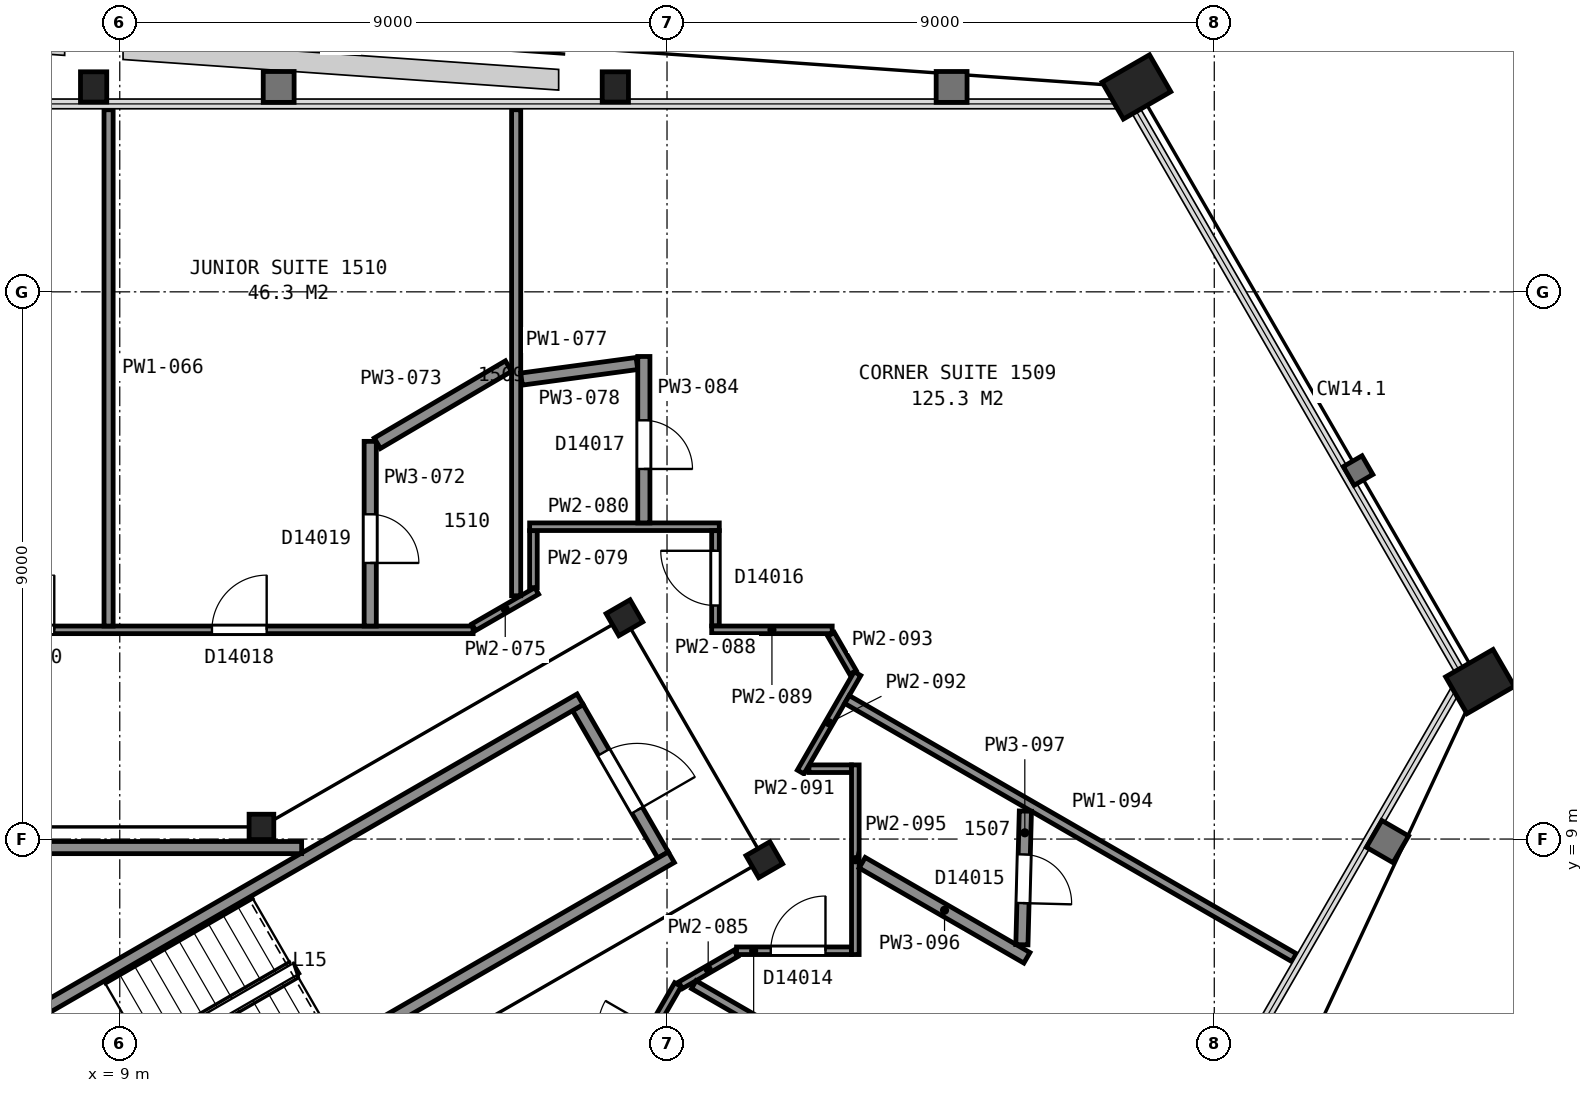
"""IFC4 building model, lengths in metres.
Left out: names, types, materials, properties, quantities, classifications, styles, units other than length and angle.
Written with IfcOpenShell. Run it as: python <this file> out.ifc"""

import sys

from ifc_helpers import new_model, si_unit, direction, frame, frame_2d, origin, origin_2d, place, context, subcontext, project, spatial, rectangle, hollow_rectangle, i_section, extrude, element, fill, save


model = new_model("IFC4")
c1 = context("Model", 3, precision=1e-05, world=origin(), true_north=direction((0.0, 1.0)))
c2 = subcontext(c1, "Body", "Model", "MODEL_VIEW")
j1 = project(units=[si_unit("LENGTHUNIT", "METRE"), si_unit("PLANEANGLEUNIT", "RADIAN")], contexts=[c1])
p1 = place(None, origin())
s1 = spatial("IfcSite", under=j1, at=p1, CompositionType="ELEMENT")
p2 = place(p1, origin())
s2 = spatial("IfcBuilding", under=s1, at=p2, CompositionType="ELEMENT")
p3 = place(p2, frame((0.0, 0.0, 69.2)))
s3 = spatial("IfcBuildingStorey", under=s2, at=p3, CompositionType="ELEMENT", Elevation=69.2)
p4 = place(p3, frame((25.72, 21.37, 0.0), z_axis=(0.0, 0.0, 1.0), x_axis=(0.5, -0.866025403784, 0.0)))
e1 = element("IfcColumn", 1, at=p4, inside=s3, PredefinedType="COLUMN", context=c2, shape_type="SweptSolid", body=[
    extrude(hollow_rectangle(XDim=0.7, YDim=0.9, WallThickness=0.065, at=origin_2d()), origin(), (0.0, 0.0, 1.0), 3.56),
])
for number, where, z_axis, x_axis in (
    (2, (17.15, 21.37, 0.0), (0.0, 0.0, 1.0), (1.0, 0.0, 0.0)),
    (3, (8.57, 21.37, 0.0), (0.0, 0.0, 1.0), (1.0, 0.0, 0.0)),
):
    element("IfcColumn", number, at=place(p3, frame(where, z_axis=z_axis, x_axis=x_axis)), inside=s3, PredefinedType="COLUMN", context=c2, shape_type="SweptSolid", body=[
        extrude(i_section(OverallWidth=0.432, OverallDepth=0.498, WebThickness=0.056, FlangeThickness=0.089, FilletRadius=0.015, at=origin_2d()), origin(), (0.0, 0.0, 1.0), 3.575),
    ])
p5 = place(p3, frame((31.37, 11.59, 0.0), z_axis=(0.0, 0.0, 1.0), x_axis=(0.5, -0.866025403784, 0.0)))
e4 = element("IfcColumn", 4, at=p5, inside=s3, PredefinedType="COLUMN", context=c2, shape_type="SweptSolid", body=[
    extrude(hollow_rectangle(XDim=0.7, YDim=0.9, WallThickness=0.065, at=origin_2d()), origin(), (0.0, 0.0, 1.0), 3.56),
])
for number, where, z_axis, x_axis in (
    (5, (19.6, 8.66, 0.0), (0.0, 0.0, 1.0), (0.5, -0.866, 0.0)),
    (6, (17.3, 12.64, 0.0), (0.0, 0.0, 1.0), (0.5, -0.866, 0.0)),
):
    element("IfcColumn", number, at=place(p3, frame(where, z_axis=z_axis, x_axis=x_axis)), inside=s3, PredefinedType="COLUMN", context=c2, shape_type="SweptSolid", body=[
        extrude(i_section(OverallWidth=0.419, OverallDepth=0.455, WebThickness=0.042, FlangeThickness=0.068, FilletRadius=0.015, at=origin_2d()), origin(), (0.0, 0.0, 1.0), 3.6),
    ])
p6 = place(p3, frame((11.33, 9.2, 0.0), z_axis=(0.0, 0.0, 1.0), x_axis=(1.0, 0.0, 0.0)))
e7 = element("IfcColumn", 7, at=p6, inside=s3, PredefinedType="COLUMN", context=c2, shape_type="SweptSolid", body=[
    extrude(i_section(OverallWidth=0.406, OverallDepth=0.417, WebThickness=0.03, FlangeThickness=0.048, FilletRadius=0.015, at=origin_2d()), origin(), (0.0, 0.0, 1.0), 3.6),
])
p7 = place(p3, frame((17.934, 8.738, 0.0), z_axis=(0.0, 0.0, 1.0), x_axis=(-0.49998411664, 0.866034573852, 0.0)))
e8 = element("IfcWall", 8, at=p7, inside=s3, PredefinedType="PARTITIONING", context=c2, shape_type="SweptSolid", body=[
    extrude(rectangle(XDim=2.8, YDim=0.2, at=frame_2d((1.4, 0.0))), origin(), (0.0, 0.0, 1.0), 3.35),
])
p8 = place(p7, frame((0.85, 0.0, 0.0)))
e9 = element("IfcOpeningElement", 9, at=p8, cuts=e8, PredefinedType="OPENING", context=c2, shape_type="SweptSolid", body=[
    extrude(rectangle(XDim=1.1, YDim=2.1, at=frame_2d((0.55, 1.05))), frame((0.0, 0.11, 0.0), z_axis=(0.0, -1.0, 0.0), x_axis=(1.0, 0.0, 0.0)), (0.0, 0.0, 1.0), 0.22),
])
for number, where, z_axis, x_axis in (
    (10, (6.178, 5.299, 0.0), (0.0, 0.0, 1.0), (0.866, 0.5, 0.0)),
    (11, (7.678, 2.701, 0.0), (0.0, 0.0, 1.0), (0.866, 0.5, 0.0)),
):
    element("IfcWall", number, at=place(p3, frame(where, z_axis=z_axis, x_axis=x_axis)), inside=s3, PredefinedType="PARTITIONING", context=c2, shape_type="SweptSolid", body=[
        extrude(rectangle(XDim=12.0, YDim=0.2, at=frame_2d((6.0, 0.0))), origin(), (0.0, 0.0, 1.0), 3.35),
    ])
p9 = place(p3, frame((6.177, 8.86, 0.0), z_axis=(0.0, 0.0, 1.0), x_axis=(1.0, 0.0, 0.0)))
e12 = element("IfcWall", 12, at=p9, inside=s3, PredefinedType="PARTITIONING", context=c2, shape_type="SweptSolid", body=[
    extrude(rectangle(XDim=5.814, YDim=0.2, at=frame_2d((2.907, 0.0))), origin(), (0.0, 0.0, 1.0), 3.35),
])
p10 = place(p3, frame((-14.811, 12.441, 0.0), z_axis=(0.0, 0.0, 1.0), x_axis=(1.0, 0.0, 0.0)))
e13 = element("IfcWall", 13, at=p10, inside=s3, PredefinedType="PARTITIONING", context=c2, shape_type="SweptSolid", body=[
    extrude(rectangle(XDim=29.621, YDim=0.125, at=frame_2d((14.811, 0.0))), origin(), (0.0, 0.0, 1.0), 2.613),
])
p11 = place(p10, frame((25.326, 0.0, 0.0)))
e14 = element("IfcOpeningElement", 14, at=p11, cuts=e13, PredefinedType="OPENING", context=c2, shape_type="SweptSolid", body=[
    extrude(rectangle(XDim=0.9, YDim=2.1, at=frame_2d((0.45, 1.05))), frame((0.0, 0.073, 0.0), z_axis=(0.0, -1.0, 0.0), x_axis=(1.0, 0.0, 0.0)), (0.0, 0.0, 1.0), 0.145),
])
p12 = place(p10, frame((21.833, 0.0, 0.0)))
e15 = element("IfcOpeningElement", 15, at=p12, cuts=e13, PredefinedType="OPENING", context=c2, shape_type="SweptSolid", body=[
    extrude(rectangle(XDim=0.9, YDim=2.1, at=frame_2d((0.45, 1.05))), frame((0.0, 0.073, 0.0), z_axis=(0.0, -1.0, 0.0), x_axis=(1.0, 0.0, 0.0)), (0.0, 0.0, 1.0), 0.145),
])
p13 = place(p10, frame((14.99, 0.0, 0.0)))
e16 = element("IfcOpeningElement", 16, at=p13, cuts=e13, PredefinedType="OPENING", context=c2, shape_type="SweptSolid", body=[
    extrude(rectangle(XDim=0.9, YDim=2.1, at=frame_2d((0.45, 1.05))), frame((0.0, 0.073, 0.0), z_axis=(0.0, -1.0, 0.0), x_axis=(1.0, 0.0, 0.0)), (0.0, 0.0, 1.0), 0.145),
])
p14 = place(p10, frame((12.128, 0.0, 0.0)))
e17 = element("IfcOpeningElement", 17, at=p14, cuts=e13, PredefinedType="OPENING", context=c2, shape_type="SweptSolid", body=[
    extrude(rectangle(XDim=0.9, YDim=2.1, at=frame_2d((0.45, 1.05))), frame((0.0, 0.073, 0.0), z_axis=(0.0, -1.0, 0.0), x_axis=(1.0, 0.0, 0.0)), (0.0, 0.0, 1.0), 0.145),
])
p15 = place(p10, frame((4.885, 0.0, 0.0)))
e18 = element("IfcOpeningElement", 18, at=p15, cuts=e13, PredefinedType="OPENING", context=c2, shape_type="SweptSolid", body=[
    extrude(rectangle(XDim=0.9, YDim=2.1, at=frame_2d((0.45, 1.05))), frame((0.0, 0.073, 0.0), z_axis=(0.0, -1.0, 0.0), x_axis=(1.0, 0.0, 0.0)), (0.0, 0.0, 1.0), 0.145),
])
p16 = place(p10, frame((2.241, 0.0, 0.0)))
e19 = element("IfcOpeningElement", 19, at=p16, cuts=e13, PredefinedType="OPENING", context=c2, shape_type="SweptSolid", body=[
    extrude(rectangle(XDim=0.9, YDim=2.1, at=frame_2d((0.45, 1.05))), frame((0.0, 0.073, 0.0), z_axis=(0.0, -1.0, 0.0), x_axis=(1.0, 0.0, 0.0)), (0.0, 0.0, 1.0), 0.145),
])
p17 = place(p3, frame((18.179, 6.606, 0.0), z_axis=(0.0, 0.0, 1.0), x_axis=(-0.500003973642, -0.866023109589, 0.0)))
e20 = element("IfcWall", 20, at=p17, inside=s3, PredefinedType="PARTITIONING", context=c2, shape_type="SweptSolid", body=[
    extrude(rectangle(XDim=28.826, YDim=0.125, at=frame_2d((14.413, 0.0))), origin(), (0.0, 0.0, 1.0), 2.613),
])
p18 = place(p17, frame((21.501, 0.0, 0.0)))
e21 = element("IfcOpeningElement", 21, at=p18, cuts=e20, PredefinedType="OPENING", context=c2, shape_type="SweptSolid", body=[
    extrude(rectangle(XDim=0.9, YDim=2.1, at=frame_2d((0.45, 1.05))), frame((0.0, 0.073, 0.0), z_axis=(0.0, -1.0, 0.0), x_axis=(1.0, 0.0, 0.0)), (0.0, 0.0, 1.0), 0.145),
])
p19 = place(p17, frame((18.894, 0.0, 0.0)))
e22 = element("IfcOpeningElement", 22, at=p19, cuts=e20, PredefinedType="OPENING", context=c2, shape_type="SweptSolid", body=[
    extrude(rectangle(XDim=0.9, YDim=2.1, at=frame_2d((0.45, 1.05))), frame((0.0, 0.073, 0.0), z_axis=(0.0, -1.0, 0.0), x_axis=(1.0, 0.0, 0.0)), (0.0, 0.0, 1.0), 0.145),
])
p20 = place(p17, frame((10.937, 0.0, 0.0)))
e23 = element("IfcOpeningElement", 23, at=p20, cuts=e20, PredefinedType="OPENING", context=c2, shape_type="SweptSolid", body=[
    extrude(rectangle(XDim=0.9, YDim=2.1, at=frame_2d((0.45, 1.05))), frame((0.0, 0.073, 0.0), z_axis=(0.0, -1.0, 0.0), x_axis=(1.0, 0.0, 0.0)), (0.0, 0.0, 1.0), 0.145),
])
p21 = place(p17, frame((7.535, 0.0, 0.0)))
e24 = element("IfcOpeningElement", 24, at=p21, cuts=e20, PredefinedType="OPENING", context=c2, shape_type="SweptSolid", body=[
    extrude(rectangle(XDim=0.9, YDim=2.1, at=frame_2d((0.45, 1.05))), frame((0.0, 0.073, 0.0), z_axis=(0.0, -1.0, 0.0), x_axis=(1.0, 0.0, 0.0)), (0.0, 0.0, 1.0), 0.145),
])
p22 = place(p17, frame((0.827, 0.0, 0.0)))
e25 = element("IfcOpeningElement", 25, at=p22, cuts=e20, PredefinedType="OPENING", context=c2, shape_type="SweptSolid", body=[
    extrude(rectangle(XDim=0.9, YDim=2.1, at=frame_2d((0.45, 1.05))), frame((0.0, 0.073, 0.0), z_axis=(0.0, -1.0, 0.0), x_axis=(1.0, 0.0, 0.0)), (0.0, 0.0, 1.0), 0.145),
])
p23 = place(p3, frame((8.816, 12.503, 0.0), z_axis=(0.0, 0.0, 1.0), x_axis=(0.0, 1.0, 0.0)))
e26 = element("IfcWall", 26, at=p23, inside=s3, PredefinedType="PARTITIONING", context=c2, shape_type="SweptSolid", body=[
    extrude(rectangle(XDim=8.492, YDim=0.15, at=frame_2d((4.246, 0.0))), origin(), (0.0, 0.0, 1.0), 2.613),
])
p24 = place(p3, frame((13.119, 15.541, 0.0), z_axis=(0.0, 0.0, 1.0), x_axis=(0.0, -1.0, 0.0)))
e27 = element("IfcWall", 27, at=p24, inside=s3, PredefinedType="PARTITIONING", context=c2, shape_type="SweptSolid", body=[
    extrude(rectangle(XDim=3.038, YDim=0.2, at=frame_2d((1.519, 0.0))), origin(), (0.0, 0.0, 1.0), 2.613),
])
p25 = place(p24, frame((1.2, 0.0, 0.0)))
e28 = element("IfcOpeningElement", 28, at=p25, cuts=e27, PredefinedType="OPENING", context=c2, shape_type="SweptSolid", body=[
    extrude(rectangle(XDim=0.8, YDim=2.1, at=frame_2d((0.4, 1.05))), frame((0.0, 0.11, 0.0), z_axis=(0.0, -1.0, 0.0), x_axis=(1.0, 0.0, 0.0)), (0.0, 0.0, 1.0), 0.22),
])
p26 = place(p3, frame((13.235, 15.51, 0.0), z_axis=(0.0, 0.0, 1.0), x_axis=(0.861909146735, 0.507062740471, 0.0)))
e29 = element("IfcWall", 29, at=p26, inside=s3, PredefinedType="PARTITIONING", context=c2, shape_type="SweptSolid", body=[
    extrude(rectangle(XDim=2.504, YDim=0.2, at=frame_2d((1.252, 0.0))), origin(), (0.0, 0.0, 1.0), 2.613),
])
p27 = place(p3, frame((14.822, 12.483, 0.0), z_axis=(0.0, 0.0, 1.0), x_axis=(0.866035997947, 0.499981649923, 0.0)))
e30 = element("IfcWall", 30, at=p27, inside=s3, PredefinedType="PARTITIONING", context=c2, shape_type="SweptSolid", body=[
    extrude(rectangle(XDim=1.196, YDim=0.125, at=frame_2d((0.598, 0.0))), origin(), (0.0, 0.0, 1.0), 2.613),
])
p28 = place(p3, frame((15.519, 13.001, 0.0), z_axis=(0.0, 0.0, 1.0), x_axis=(0.0, 1.0, 0.0)))
e31 = element("IfcWall", 31, at=p28, inside=s3, PredefinedType="PARTITIONING", context=c2, shape_type="SweptSolid", body=[
    extrude(rectangle(XDim=7.994, YDim=0.15, at=frame_2d((3.997, 0.0))), origin(), (0.0, 0.0, 1.0), 2.613),
])
p29 = place(p3, frame((15.607, 16.565, 0.0), z_axis=(0.0, 0.0, 1.0), x_axis=(0.990982367401, 0.133992341199, 0.0)))
e32 = element("IfcWall", 32, at=p29, inside=s3, PredefinedType="PARTITIONING", context=c2, shape_type="SweptSolid", body=[
    extrude(rectangle(XDim=1.915, YDim=0.2, at=frame_2d((0.958, 0.0))), origin(), (0.0, 0.0, 1.0), 2.613),
])
p30 = place(p3, frame((15.803, 13.135, 0.0), z_axis=(0.0, 0.0, 1.0), x_axis=(0.0, 1.0, 0.0)))
e33 = element("IfcWall", 33, at=p30, inside=s3, PredefinedType="PARTITIONING", context=c2, shape_type="SweptSolid", body=[
    extrude(rectangle(XDim=0.937, YDim=0.125, at=frame_2d((0.469, 0.0))), origin(), (0.0, 0.0, 1.0), 2.613),
])
p31 = place(p3, frame((15.74, 14.137, 0.0), z_axis=(0.0, 0.0, 1.0), x_axis=(1.0, 0.0, 0.0)))
e34 = element("IfcWall", 34, at=p31, inside=s3, PredefinedType="PARTITIONING", context=c2, shape_type="SweptSolid", body=[
    extrude(rectangle(XDim=3.119, YDim=0.125, at=frame_2d((1.56, 0.0))), origin(), (0.0, 0.0, 1.0), 2.613),
])
p32 = place(p3, frame((17.619, 14.199, 0.0), z_axis=(0.0, 0.0, 1.0), x_axis=(0.0, 1.0, 0.0)))
e35 = element("IfcWall", 35, at=p32, inside=s3, PredefinedType="PARTITIONING", context=c2, shape_type="SweptSolid", body=[
    extrude(rectangle(XDim=2.738, YDim=0.2, at=frame_2d((1.369, 0.0))), origin(), (0.0, 0.0, 1.0), 2.613),
])
p33 = place(p32, frame((0.887, 0.0, 0.0)))
e36 = element("IfcOpeningElement", 36, at=p33, cuts=e35, PredefinedType="OPENING", context=c2, shape_type="SweptSolid", body=[
    extrude(rectangle(XDim=0.8, YDim=2.1, at=frame_2d((0.4, 1.05))), frame((0.0, 0.11, 0.0), z_axis=(0.0, -1.0, 0.0), x_axis=(1.0, 0.0, 0.0)), (0.0, 0.0, 1.0), 0.22),
])
p34 = place(p3, frame((18.222, 6.594, 0.0), z_axis=(0.0, 0.0, 1.0), x_axis=(0.865876245925, 0.500258260045, 0.0)))
e37 = element("IfcWall", 37, at=p34, inside=s3, PredefinedType="PARTITIONING", context=c2, shape_type="SweptSolid", body=[
    extrude(rectangle(XDim=1.052, YDim=0.125, at=frame_2d((0.526, 0.0))), origin(), (0.0, 0.0, 1.0), 2.613),
])
p35 = place(p3, frame((18.44, 6.605, 0.0), z_axis=(0.0, 0.0, 1.0), x_axis=(0.866044499518, -0.49996692376, 0.0)))
e38 = element("IfcWall", 38, at=p35, inside=s3, PredefinedType="PARTITIONING", context=c2, shape_type="SweptSolid", body=[
    extrude(rectangle(XDim=8.328, YDim=0.15, at=frame_2d((4.164, 0.0))), origin(), (0.0, 0.0, 1.0), 2.613),
])
p36 = place(p3, frame((18.797, 14.072, 0.0), z_axis=(0.0, 0.0, 1.0), x_axis=(0.0, -1.0, 0.0)))
e39 = element("IfcWall", 39, at=p36, inside=s3, PredefinedType="PARTITIONING", context=c2, shape_type="SweptSolid", body=[
    extrude(rectangle(XDim=1.566, YDim=0.125, at=frame_2d((0.783, 0.0))), origin(), (0.0, 0.0, 1.0), 2.613),
])
p37 = place(p36, frame((0.331, 0.0, 0.0)))
e40 = element("IfcOpeningElement", 40, at=p37, cuts=e39, PredefinedType="OPENING", context=c2, shape_type="SweptSolid", body=[
    extrude(rectangle(XDim=0.9, YDim=2.1, at=frame_2d((0.45, 1.05))), frame((0.0, 0.073, 0.0), z_axis=(0.0, -1.0, 0.0), x_axis=(1.0, 0.0, 0.0)), (0.0, 0.0, 1.0), 0.145),
])
p38 = place(p3, frame((18.735, 12.441, 0.0), z_axis=(0.0, 0.0, 1.0), x_axis=(1.0, 0.0, 0.0)))
e41 = element("IfcWall", 41, at=p38, inside=s3, PredefinedType="PARTITIONING", context=c2, shape_type="SweptSolid", body=[
    extrude(rectangle(XDim=1.982, YDim=0.125, at=frame_2d((0.991, 0.0))), origin(), (0.0, 0.0, 1.0), 2.613),
])
p39 = place(p3, frame((21.032, 7.163, 0.0), z_axis=(0.0, 0.0, 1.0), x_axis=(-1.0, 0.0, 0.0)))
e42 = element("IfcWall", 42, at=p39, inside=s3, PredefinedType="PARTITIONING", context=c2, shape_type="SweptSolid", body=[
    extrude(rectangle(XDim=1.888, YDim=0.125, at=frame_2d((0.944, 0.0))), origin(), (0.0, 0.0, 1.0), 2.613),
])
p40 = place(p39, frame((0.426, 0.0, 0.0)))
e43 = element("IfcOpeningElement", 43, at=p40, cuts=e42, PredefinedType="OPENING", context=c2, shape_type="SweptSolid", body=[
    extrude(rectangle(XDim=0.9, YDim=2.1, at=frame_2d((0.45, 1.05))), frame((0.0, 0.073, 0.0), z_axis=(0.0, -1.0, 0.0), x_axis=(1.0, 0.0, 0.0)), (0.0, 0.0, 1.0), 0.145),
])
p41 = place(p3, frame((20.334, 10.157, 0.0), z_axis=(0.0, 0.0, 1.0), x_axis=(1.0, 0.0, 0.0)))
e44 = element("IfcWall", 44, at=p41, inside=s3, PredefinedType="PARTITIONING", context=c2, shape_type="SweptSolid", body=[
    extrude(rectangle(XDim=0.698, YDim=0.125, at=frame_2d((0.349, 0.0))), origin(), (0.0, 0.0, 1.0), 2.613),
])
p42 = place(p3, frame((20.198, 10.103, 0.0), z_axis=(0.0, 0.0, 1.0), x_axis=(0.500072997275, 0.865983254686, 0.0)))
e45 = element("IfcWall", 45, at=p42, inside=s3, PredefinedType="PARTITIONING", context=c2, shape_type="SweptSolid", body=[
    extrude(rectangle(XDim=1.869, YDim=0.125, at=frame_2d((0.935, 0.0))), origin(), (0.0, 0.0, 1.0), 2.613),
])
p43 = place(p3, frame((20.697, 12.367, 0.0), z_axis=(0.0, 0.0, 1.0), x_axis=(0.500238258503, -0.865887801468, 0.0)))
e46 = element("IfcWall", 46, at=p43, inside=s3, PredefinedType="PARTITIONING", context=c2, shape_type="SweptSolid", body=[
    extrude(rectangle(XDim=0.724, YDim=0.125, at=frame_2d((0.362, 0.0))), origin(), (0.0, 0.0, 1.0), 2.613),
])
p44 = place(p3, frame((20.959, 11.296, 0.0), z_axis=(0.0, 0.0, 1.0), x_axis=(0.866022790583, -0.50000452617, 0.0)))
e47 = element("IfcWall", 47, at=p44, inside=s3, PredefinedType="PARTITIONING", context=c2, shape_type="SweptSolid", body=[
    extrude(rectangle(XDim=8.491, YDim=0.15, at=frame_2d((4.246, 0.0))), origin(), (0.0, 0.0, 1.0), 2.613),
])
p45 = place(p3, frame((21.097, 7.101, 0.0), z_axis=(0.0, 0.0, 1.0), x_axis=(0.0, 1.0, 0.0)))
e48 = element("IfcWall", 48, at=p45, inside=s3, PredefinedType="PARTITIONING", context=c2, shape_type="SweptSolid", body=[
    extrude(rectangle(XDim=3.119, YDim=0.125, at=frame_2d((1.56, 0.0))), origin(), (0.0, 0.0, 1.0), 2.613),
])
p46 = place(p3, frame((21.209, 8.611, 0.0), z_axis=(0.0, 0.0, 1.0), x_axis=(0.866054327916, -0.499949898588, 0.0)))
e49 = element("IfcWall", 49, at=p46, inside=s3, PredefinedType="PARTITIONING", context=c2, shape_type="SweptSolid", body=[
    extrude(rectangle(XDim=3.128, YDim=0.2, at=frame_2d((1.564, 0.0))), origin(), (0.0, 0.0, 1.0), 2.613),
])
p47 = place(p3, frame((23.836, 7.262, 0.0), z_axis=(0.0, 0.0, 1.0), x_axis=(0.025988330811, 0.999662246292, 0.0)))
e50 = element("IfcWall", 50, at=p47, inside=s3, PredefinedType="PARTITIONING", context=c2, shape_type="SweptSolid", body=[
    extrude(rectangle(XDim=2.198, YDim=0.2, at=frame_2d((1.099, 0.0))), origin(), (0.0, 0.0, 1.0), 2.613),
])
p48 = place(p47, frame((0.685, 0.0, 0.0)))
e51 = element("IfcOpeningElement", 51, at=p48, cuts=e50, PredefinedType="OPENING", context=c2, shape_type="SweptSolid", body=[
    extrude(rectangle(XDim=0.8, YDim=2.1, at=frame_2d((0.4, 1.05))), frame((0.0, 0.11, 0.0), z_axis=(0.0, -1.0, 0.0), x_axis=(1.0, 0.0, 0.0)), (0.0, 0.0, 1.0), 0.22),
])
p49 = place(p8, origin())
e52 = element("IfcDoor", 52, at=p49, inside=s3, OperationType="SINGLE_SWING_LEFT", PredefinedType="DOOR", context=c2, shape_type="SweptSolid", body=[
    extrude(rectangle(XDim=1.1, YDim=2.1, at=frame_2d((0.55, 1.05))), frame((0.0, 0.025, 0.0), z_axis=(0.0, -1.0, 0.0), x_axis=(1.0, 0.0, 0.0)), (0.0, 0.0, 1.0), 0.05),
])
fill(e9, e52)
p50 = place(p11, origin())
e53 = element("IfcDoor", 53, at=p50, inside=s3, OperationType="SINGLE_SWING_RIGHT", PredefinedType="DOOR", context=c2, shape_type="SweptSolid", body=[
    extrude(rectangle(XDim=0.9, YDim=2.1, at=frame_2d((0.45, 1.05))), frame((0.0, 0.025, 0.0), z_axis=(0.0, -1.0, 0.0), x_axis=(1.0, 0.0, 0.0)), (0.0, 0.0, 1.0), 0.05),
])
fill(e14, e53)
p51 = place(p12, origin())
e54 = element("IfcDoor", 54, at=p51, inside=s3, OperationType="SINGLE_SWING_RIGHT", PredefinedType="DOOR", context=c2, shape_type="SweptSolid", body=[
    extrude(rectangle(XDim=0.9, YDim=2.1, at=frame_2d((0.45, 1.05))), frame((0.0, 0.025, 0.0), z_axis=(0.0, -1.0, 0.0), x_axis=(1.0, 0.0, 0.0)), (0.0, 0.0, 1.0), 0.05),
])
fill(e15, e54)
p52 = place(p25, origin())
e55 = element("IfcDoor", 55, at=p52, inside=s3, OperationType="SINGLE_SWING_RIGHT", PredefinedType="DOOR", context=c2, shape_type="SweptSolid", body=[
    extrude(rectangle(XDim=0.8, YDim=2.1, at=frame_2d((0.4, 1.05))), frame((0.0, 0.025, 0.0), z_axis=(0.0, -1.0, 0.0), x_axis=(1.0, 0.0, 0.0)), (0.0, 0.0, 1.0), 0.05),
])
fill(e28, e55)
p53 = place(p33, origin())
e56 = element("IfcDoor", 56, at=p53, inside=s3, OperationType="SINGLE_SWING_LEFT", PredefinedType="DOOR", context=c2, shape_type="SweptSolid", body=[
    extrude(rectangle(XDim=0.8, YDim=2.1, at=frame_2d((0.4, 1.05))), frame((0.0, 0.025, 0.0), z_axis=(0.0, -1.0, 0.0), x_axis=(1.0, 0.0, 0.0)), (0.0, 0.0, 1.0), 0.05),
])
fill(e36, e56)
p54 = place(p37, origin())
e57 = element("IfcDoor", 57, at=p54, inside=s3, OperationType="SINGLE_SWING_LEFT", PredefinedType="DOOR", context=c2, shape_type="SweptSolid", body=[
    extrude(rectangle(XDim=0.9, YDim=2.1, at=frame_2d((0.45, 1.05))), frame((0.0, 0.025, 0.0), z_axis=(0.0, -1.0, 0.0), x_axis=(1.0, 0.0, 0.0)), (0.0, 0.0, 1.0), 0.05),
])
fill(e40, e57)
p55 = place(p40, origin())
e58 = element("IfcDoor", 58, at=p55, inside=s3, OperationType="SINGLE_SWING_LEFT", PredefinedType="DOOR", context=c2, shape_type="SweptSolid", body=[
    extrude(rectangle(XDim=0.9, YDim=2.1, at=frame_2d((0.45, 1.05))), frame((0.0, 0.025, 0.0), z_axis=(0.0, -1.0, 0.0), x_axis=(1.0, 0.0, 0.0)), (0.0, 0.0, 1.0), 0.05),
])
fill(e43, e58)
p56 = place(p48, origin())
e59 = element("IfcDoor", 59, at=p56, inside=s3, OperationType="SINGLE_SWING_LEFT", PredefinedType="DOOR", context=c2, shape_type="SweptSolid", body=[
    extrude(rectangle(XDim=0.8, YDim=2.1, at=frame_2d((0.4, 1.05))), frame((0.0, 0.025, 0.0), z_axis=(0.0, -1.0, 0.0), x_axis=(1.0, 0.0, 0.0)), (0.0, 0.0, 1.0), 0.05),
])
fill(e51, e59)
save(model, sys.argv[1])
